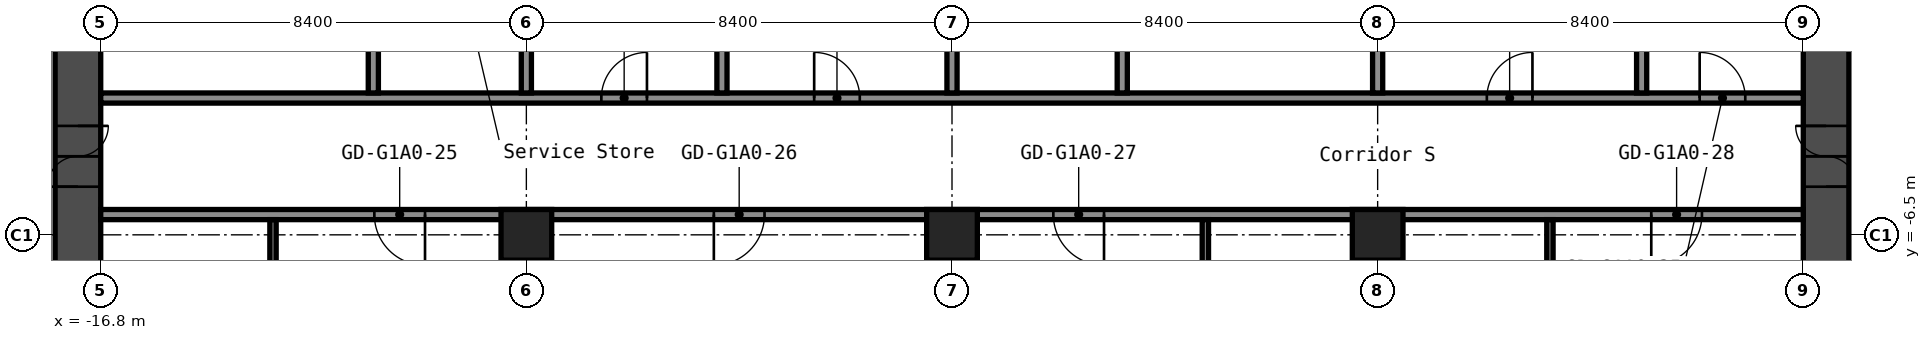
"""IFC4 building model, lengths in metres.
Left out: names, types, materials, properties, quantities, classifications, styles, units other than length and angle.
Written with IfcOpenShell. Run it as: python <this file> out.ifc"""

import sys

from ifc_helpers import new_model, si_unit, direction, frame, frame_2d, origin, origin_2d, place, context, subcontext, project, spatial, rectangle, hollow_rectangle, extrude, element, fill, save


model = new_model("IFC4")
c1 = context("Model", 3, precision=1e-05, world=origin(), true_north=direction((0.0, 1.0)))
c2 = subcontext(c1, "Body", "Model", "MODEL_VIEW")
j1 = project(units=[si_unit("LENGTHUNIT", "METRE"), si_unit("PLANEANGLEUNIT", "RADIAN")], contexts=[c1])
p1 = place(None, origin())
s1 = spatial("IfcSite", under=j1, at=p1, CompositionType="ELEMENT")
p2 = place(p1, origin())
s2 = spatial("IfcBuilding", under=s1, at=p2, CompositionType="ELEMENT")
p3 = place(p2, frame((0.0, 0.0, 19.8)))
s3 = spatial("IfcBuildingStorey", under=s2, at=p3, CompositionType="ELEMENT", Elevation=19.8)
for number, where, z_axis, x_axis in (
    (1, (-8.4, -6.5, 0.0), (0.0, 0.0, 1.0), (1.0, 0.0, 0.0)),
    (2, (0.0, -6.5, 0.0), (0.0, 0.0, 1.0), (1.0, 0.0, 0.0)),
    (3, (8.4, -6.5, 0.0), (0.0, 0.0, 1.0), (1.0, 0.0, 0.0)),
):
    element("IfcColumn", number, at=place(p3, frame(where, z_axis=z_axis, x_axis=x_axis)), inside=s3, PredefinedType="COLUMN", context=c2, shape_type="SweptSolid", body=[
        extrude(hollow_rectangle(XDim=1.0, YDim=1.0, WallThickness=0.04, at=origin_2d()), origin(), (0.0, 0.0, 1.0), 2.8),
    ])
p4 = place(p3, frame((-17.25, -8.4, 0.0), z_axis=(0.0, 0.0, 1.0), x_axis=(0.0, 1.0, 0.0)))
e4 = element("IfcWall", 4, at=p4, inside=s3, PredefinedType="SHEAR", context=c2, shape_type="SweptSolid", body=[
    extrude(rectangle(XDim=16.8, YDim=0.9, at=frame_2d((8.4, 0.0))), origin(), (0.0, 0.0, 1.0), 2.8),
])
p5 = place(p4, frame((12.75, 0.0, 0.0)))
e5 = element("IfcOpeningElement", 5, at=p5, cuts=e4, PredefinedType="OPENING", context=c2, shape_type="SweptSolid", body=[
    extrude(rectangle(XDim=1.2, YDim=2.1, at=frame_2d((0.6, 1.05))), frame((0.0, 0.46, 0.0), z_axis=(0.0, -1.0, 0.0), x_axis=(1.0, 0.0, 0.0)), (0.0, 0.0, 1.0), 0.92),
])
p6 = place(p4, frame((2.85, 0.0, 0.0)))
e6 = element("IfcOpeningElement", 6, at=p6, cuts=e4, PredefinedType="OPENING", context=c2, shape_type="SweptSolid", body=[
    extrude(rectangle(XDim=1.2, YDim=2.1, at=frame_2d((0.6, 1.05))), frame((0.0, 0.46, 0.0), z_axis=(0.0, -1.0, 0.0), x_axis=(1.0, 0.0, 0.0)), (0.0, 0.0, 1.0), 0.92),
])
p7 = place(p3, frame((17.25, -8.4, 0.0), z_axis=(0.0, 0.0, 1.0), x_axis=(0.0, 1.0, 0.0)))
e7 = element("IfcWall", 7, at=p7, inside=s3, PredefinedType="SHEAR", context=c2, shape_type="SweptSolid", body=[
    extrude(rectangle(XDim=16.8, YDim=0.9, at=frame_2d((8.4, 0.0))), origin(), (0.0, 0.0, 1.0), 2.8),
])
p8 = place(p7, frame((12.75, 0.0, 0.0)))
e8 = element("IfcOpeningElement", 8, at=p8, cuts=e7, PredefinedType="OPENING", context=c2, shape_type="SweptSolid", body=[
    extrude(rectangle(XDim=1.2, YDim=2.1, at=frame_2d((0.6, 1.05))), frame((0.0, 0.46, 0.0), z_axis=(0.0, -1.0, 0.0), x_axis=(1.0, 0.0, 0.0)), (0.0, 0.0, 1.0), 0.92),
])
p9 = place(p7, frame((2.85, 0.0, 0.0)))
e9 = element("IfcOpeningElement", 9, at=p9, cuts=e7, PredefinedType="OPENING", context=c2, shape_type="SweptSolid", body=[
    extrude(rectangle(XDim=1.2, YDim=2.1, at=frame_2d((0.6, 1.05))), frame((0.0, 0.46, 0.0), z_axis=(0.0, -1.0, 0.0), x_axis=(1.0, 0.0, 0.0)), (0.0, 0.0, 1.0), 0.92),
])
p10 = place(p3, frame((-16.8, -6.1, 0.0), z_axis=(0.0, 0.0, 1.0), x_axis=(1.0, 0.0, 0.0)))
e10 = element("IfcWall", 10, at=p10, inside=s3, PredefinedType="PARTITIONING", context=c2, shape_type="SweptSolid", body=[
    extrude(rectangle(XDim=33.6, YDim=0.2, at=frame_2d((16.8, 0.0))), origin(), (0.0, 0.0, 1.0), 2.8),
])
p11 = place(p10, frame((5.4, 0.0, 0.0)))
e11 = element("IfcOpeningElement", 11, at=p11, cuts=e10, PredefinedType="OPENING", context=c2, shape_type="SweptSolid", body=[
    extrude(rectangle(XDim=1.0, YDim=2.1, at=frame_2d((0.5, 1.05))), frame((0.0, 0.11, 0.0), z_axis=(0.0, -1.0, 0.0), x_axis=(1.0, 0.0, 0.0)), (0.0, 0.0, 1.0), 0.22),
])
p12 = place(p10, frame((12.1, 0.0, 0.0)))
e12 = element("IfcOpeningElement", 12, at=p12, cuts=e10, PredefinedType="OPENING", context=c2, shape_type="SweptSolid", body=[
    extrude(rectangle(XDim=1.0, YDim=2.1, at=frame_2d((0.5, 1.05))), frame((0.0, 0.11, 0.0), z_axis=(0.0, -1.0, 0.0), x_axis=(1.0, 0.0, 0.0)), (0.0, 0.0, 1.0), 0.22),
])
p13 = place(p10, frame((18.8, 0.0, 0.0)))
e13 = element("IfcOpeningElement", 13, at=p13, cuts=e10, PredefinedType="OPENING", context=c2, shape_type="SweptSolid", body=[
    extrude(rectangle(XDim=1.0, YDim=2.1, at=frame_2d((0.5, 1.05))), frame((0.0, 0.11, 0.0), z_axis=(0.0, -1.0, 0.0), x_axis=(1.0, 0.0, 0.0)), (0.0, 0.0, 1.0), 0.22),
])
p14 = place(p10, frame((30.6, 0.0, 0.0)))
e14 = element("IfcOpeningElement", 14, at=p14, cuts=e10, PredefinedType="OPENING", context=c2, shape_type="SweptSolid", body=[
    extrude(rectangle(XDim=1.0, YDim=2.1, at=frame_2d((0.5, 1.05))), frame((0.0, 0.11, 0.0), z_axis=(0.0, -1.0, 0.0), x_axis=(1.0, 0.0, 0.0)), (0.0, 0.0, 1.0), 0.22),
])
p15 = place(p3, frame((-16.8, -3.8, 0.0), z_axis=(0.0, 0.0, 1.0), x_axis=(1.0, 0.0, 0.0)))
e15 = element("IfcWall", 15, at=p15, inside=s3, PredefinedType="PARTITIONING", context=c2, shape_type="SweptSolid", body=[
    extrude(rectangle(XDim=33.6, YDim=0.2, at=frame_2d((16.8, 0.0))), origin(), (0.0, 0.0, 1.0), 2.8),
])
p16 = place(p15, frame((9.88, 0.0, 0.0)))
e16 = element("IfcOpeningElement", 16, at=p16, cuts=e15, PredefinedType="OPENING", context=c2, shape_type="SweptSolid", body=[
    extrude(rectangle(XDim=0.9, YDim=2.1, at=frame_2d((0.45, 1.05))), frame((0.0, 0.11, 0.0), z_axis=(0.0, -1.0, 0.0), x_axis=(1.0, 0.0, 0.0)), (0.0, 0.0, 1.0), 0.22),
])
p17 = place(p15, frame((14.08, 0.0, 0.0)))
e17 = element("IfcOpeningElement", 17, at=p17, cuts=e15, PredefinedType="OPENING", context=c2, shape_type="SweptSolid", body=[
    extrude(rectangle(XDim=0.9, YDim=2.1, at=frame_2d((0.45, 1.05))), frame((0.0, 0.11, 0.0), z_axis=(0.0, -1.0, 0.0), x_axis=(1.0, 0.0, 0.0)), (0.0, 0.0, 1.0), 0.22),
])
p18 = place(p15, frame((27.355, 0.0, 0.0)))
e18 = element("IfcOpeningElement", 18, at=p18, cuts=e15, PredefinedType="OPENING", context=c2, shape_type="SweptSolid", body=[
    extrude(rectangle(XDim=0.9, YDim=2.1, at=frame_2d((0.45, 1.05))), frame((0.0, 0.11, 0.0), z_axis=(0.0, -1.0, 0.0), x_axis=(1.0, 0.0, 0.0)), (0.0, 0.0, 1.0), 0.22),
])
p19 = place(p15, frame((31.555, 0.0, 0.0)))
e19 = element("IfcOpeningElement", 19, at=p19, cuts=e15, PredefinedType="OPENING", context=c2, shape_type="SweptSolid", body=[
    extrude(rectangle(XDim=0.9, YDim=2.1, at=frame_2d((0.45, 1.05))), frame((0.0, 0.11, 0.0), z_axis=(0.0, -1.0, 0.0), x_axis=(1.0, 0.0, 0.0)), (0.0, 0.0, 1.0), 0.22),
])
p20 = place(p3, frame((-13.4, -9.5, 0.0), z_axis=(0.0, 0.0, 1.0), x_axis=(0.0, 1.0, 0.0)))
e20 = element("IfcWall", 20, at=p20, inside=s3, PredefinedType="PARTITIONING", context=c2, shape_type="SweptSolid", body=[
    extrude(rectangle(XDim=3.3, YDim=0.125, at=frame_2d((1.65, 0.0))), origin(), (0.0, 0.0, 1.0), 2.8),
])
p21 = place(p3, frame((-11.42, -3.7, 0.0), z_axis=(0.0, 0.0, 1.0), x_axis=(0.0, 1.0, 0.0)))
e21 = element("IfcWall", 21, at=p21, inside=s3, PredefinedType="PARTITIONING", context=c2, shape_type="SweptSolid", body=[
    extrude(rectangle(XDim=7.4, YDim=0.2, at=frame_2d((3.7, 0.0))), origin(), (0.0, 0.0, 1.0), 2.8),
])
p22 = place(p3, frame((-8.4, -20.3, 0.0), z_axis=(0.0, 0.0, 1.0), x_axis=(0.0, 1.0, 0.0)))
e22 = element("IfcWall", 22, at=p22, inside=s3, PredefinedType="PARTITIONING", context=c2, shape_type="SweptSolid", body=[
    extrude(rectangle(XDim=13.31, YDim=0.2, at=frame_2d((6.655, 0.0))), origin(), (0.0, 0.0, 1.0), 2.8),
])
for number, where, z_axis, x_axis in (
    (23, (-8.4, -3.7, 0.0), (0.0, 0.0, 1.0), (0.0, 1.0, 0.0)),
    (24, (-4.54, -3.7, 0.0), (0.0, 0.0, 1.0), (0.0, 1.0, 0.0)),
):
    element("IfcWall", number, at=place(p3, frame(where, z_axis=z_axis, x_axis=x_axis)), inside=s3, PredefinedType="PARTITIONING", context=c2, shape_type="SweptSolid", body=[
        extrude(rectangle(XDim=7.4, YDim=0.2, at=frame_2d((3.7, 0.0))), origin(), (0.0, 0.0, 1.0), 2.8),
    ])
p23 = place(p3, frame((0.0, -20.3, 0.0), z_axis=(0.0, 0.0, 1.0), x_axis=(0.0, 1.0, 0.0)))
e25 = element("IfcWall", 25, at=p23, inside=s3, PredefinedType="PARTITIONING", context=c2, shape_type="SweptSolid", body=[
    extrude(rectangle(XDim=13.31, YDim=0.2, at=frame_2d((6.655, 0.0))), origin(), (0.0, 0.0, 1.0), 2.8),
])
for number, where, z_axis, x_axis in (
    (26, (0.0, -3.7, 0.0), (0.0, 0.0, 1.0), (0.0, 1.0, 0.0)),
    (27, (3.36, -3.7, 0.0), (0.0, 0.0, 1.0), (0.0, 1.0, 0.0)),
):
    element("IfcWall", number, at=place(p3, frame(where, z_axis=z_axis, x_axis=x_axis)), inside=s3, PredefinedType="PARTITIONING", context=c2, shape_type="SweptSolid", body=[
        extrude(rectangle(XDim=7.4, YDim=0.2, at=frame_2d((3.7, 0.0))), origin(), (0.0, 0.0, 1.0), 2.8),
    ])
p24 = place(p3, frame((5.0, -9.5, 0.0), z_axis=(0.0, 0.0, 1.0), x_axis=(0.0, 1.0, 0.0)))
e28 = element("IfcWall", 28, at=p24, inside=s3, PredefinedType="PARTITIONING", context=c2, shape_type="SweptSolid", body=[
    extrude(rectangle(XDim=3.3, YDim=0.125, at=frame_2d((1.65, 0.0))), origin(), (0.0, 0.0, 1.0), 2.8),
])
p25 = place(p3, frame((8.4, -20.3, 0.0), z_axis=(0.0, 0.0, 1.0), x_axis=(0.0, 1.0, 0.0)))
e29 = element("IfcWall", 29, at=p25, inside=s3, PredefinedType="PARTITIONING", context=c2, shape_type="SweptSolid", body=[
    extrude(rectangle(XDim=13.31, YDim=0.2, at=frame_2d((6.655, 0.0))), origin(), (0.0, 0.0, 1.0), 2.8),
])
p26 = place(p3, frame((8.4, -3.7, 0.0), z_axis=(0.0, 0.0, 1.0), x_axis=(0.0, 1.0, 0.0)))
e30 = element("IfcWall", 30, at=p26, inside=s3, PredefinedType="PARTITIONING", context=c2, shape_type="SweptSolid", body=[
    extrude(rectangle(XDim=7.4, YDim=0.2, at=frame_2d((3.7, 0.0))), origin(), (0.0, 0.0, 1.0), 2.8),
])
p27 = place(p3, frame((11.8, -9.5, 0.0), z_axis=(0.0, 0.0, 1.0), x_axis=(0.0, 1.0, 0.0)))
e31 = element("IfcWall", 31, at=p27, inside=s3, PredefinedType="PARTITIONING", context=c2, shape_type="SweptSolid", body=[
    extrude(rectangle(XDim=3.3, YDim=0.125, at=frame_2d((1.65, 0.0))), origin(), (0.0, 0.0, 1.0), 2.8),
])
p28 = place(p3, frame((13.61, -3.7, 0.0), z_axis=(0.0, 0.0, 1.0), x_axis=(0.0, 1.0, 0.0)))
e32 = element("IfcWall", 32, at=p28, inside=s3, PredefinedType="PARTITIONING", context=c2, shape_type="SweptSolid", body=[
    extrude(rectangle(XDim=7.4, YDim=0.2, at=frame_2d((3.7, 0.0))), origin(), (0.0, 0.0, 1.0), 2.8),
])
p29 = place(p6, origin())
e33 = element("IfcDoor", 33, at=p29, inside=s3, OperationType="DOUBLE_DOOR_SINGLE_SWING", PredefinedType="DOOR", context=c2, shape_type="SweptSolid", body=[
    extrude(rectangle(XDim=1.2, YDim=2.1, at=frame_2d((0.6, 1.05))), frame((0.0, 0.025, 0.0), z_axis=(0.0, -1.0, 0.0), x_axis=(1.0, 0.0, 0.0)), (0.0, 0.0, 1.0), 0.05),
])
fill(e6, e33)
p30 = place(p9, origin())
e34 = element("IfcDoor", 34, at=p30, inside=s3, OperationType="DOUBLE_DOOR_SINGLE_SWING", PredefinedType="DOOR", context=c2, shape_type="SweptSolid", body=[
    extrude(rectangle(XDim=1.2, YDim=2.1, at=frame_2d((0.6, 1.05))), frame((0.0, 0.025, 0.0), z_axis=(0.0, -1.0, 0.0), x_axis=(1.0, 0.0, 0.0)), (0.0, 0.0, 1.0), 0.05),
])
fill(e9, e34)
p31 = place(p11, origin())
e35 = element("IfcDoor", 35, at=p31, inside=s3, OperationType="SINGLE_SWING_RIGHT", PredefinedType="DOOR", context=c2, shape_type="SweptSolid", body=[
    extrude(rectangle(XDim=1.0, YDim=2.1, at=frame_2d((0.5, 1.05))), frame((0.0, 0.025, 0.0), z_axis=(0.0, -1.0, 0.0), x_axis=(1.0, 0.0, 0.0)), (0.0, 0.0, 1.0), 0.05),
])
fill(e11, e35)
p32 = place(p12, origin())
e36 = element("IfcDoor", 36, at=p32, inside=s3, OperationType="SINGLE_SWING_LEFT", PredefinedType="DOOR", context=c2, shape_type="SweptSolid", body=[
    extrude(rectangle(XDim=1.0, YDim=2.1, at=frame_2d((0.5, 1.05))), frame((0.0, 0.025, 0.0), z_axis=(0.0, -1.0, 0.0), x_axis=(1.0, 0.0, 0.0)), (0.0, 0.0, 1.0), 0.05),
])
fill(e12, e36)
p33 = place(p13, origin())
e37 = element("IfcDoor", 37, at=p33, inside=s3, OperationType="SINGLE_SWING_RIGHT", PredefinedType="DOOR", context=c2, shape_type="SweptSolid", body=[
    extrude(rectangle(XDim=1.0, YDim=2.1, at=frame_2d((0.5, 1.05))), frame((0.0, 0.025, 0.0), z_axis=(0.0, -1.0, 0.0), x_axis=(1.0, 0.0, 0.0)), (0.0, 0.0, 1.0), 0.05),
])
fill(e13, e37)
p34 = place(p14, origin())
e38 = element("IfcDoor", 38, at=p34, inside=s3, OperationType="SINGLE_SWING_LEFT", PredefinedType="DOOR", context=c2, shape_type="SweptSolid", body=[
    extrude(rectangle(XDim=1.0, YDim=2.1, at=frame_2d((0.5, 1.05))), frame((0.0, 0.025, 0.0), z_axis=(0.0, -1.0, 0.0), x_axis=(1.0, 0.0, 0.0)), (0.0, 0.0, 1.0), 0.05),
])
fill(e14, e38)
p35 = place(p16, origin())
e39 = element("IfcDoor", 39, at=p35, inside=s3, OperationType="SINGLE_SWING_LEFT", PredefinedType="DOOR", context=c2, shape_type="SweptSolid", body=[
    extrude(rectangle(XDim=0.9, YDim=2.1, at=frame_2d((0.45, 1.05))), frame((0.0, 0.025, 0.0), z_axis=(0.0, -1.0, 0.0), x_axis=(1.0, 0.0, 0.0)), (0.0, 0.0, 1.0), 0.05),
])
fill(e16, e39)
p36 = place(p17, origin())
e40 = element("IfcDoor", 40, at=p36, inside=s3, OperationType="SINGLE_SWING_RIGHT", PredefinedType="DOOR", context=c2, shape_type="SweptSolid", body=[
    extrude(rectangle(XDim=0.9, YDim=2.1, at=frame_2d((0.45, 1.05))), frame((0.0, 0.025, 0.0), z_axis=(0.0, -1.0, 0.0), x_axis=(1.0, 0.0, 0.0)), (0.0, 0.0, 1.0), 0.05),
])
fill(e17, e40)
p37 = place(p18, origin())
e41 = element("IfcDoor", 41, at=p37, inside=s3, OperationType="SINGLE_SWING_LEFT", PredefinedType="DOOR", context=c2, shape_type="SweptSolid", body=[
    extrude(rectangle(XDim=0.9, YDim=2.1, at=frame_2d((0.45, 1.05))), frame((0.0, 0.025, 0.0), z_axis=(0.0, -1.0, 0.0), x_axis=(1.0, 0.0, 0.0)), (0.0, 0.0, 1.0), 0.05),
])
fill(e18, e41)
p38 = place(p19, origin())
e42 = element("IfcDoor", 42, at=p38, inside=s3, OperationType="SINGLE_SWING_RIGHT", PredefinedType="DOOR", context=c2, shape_type="SweptSolid", body=[
    extrude(rectangle(XDim=0.9, YDim=2.1, at=frame_2d((0.45, 1.05))), frame((0.0, 0.025, 0.0), z_axis=(0.0, -1.0, 0.0), x_axis=(1.0, 0.0, 0.0)), (0.0, 0.0, 1.0), 0.05),
])
fill(e19, e42)
save(model, sys.argv[1])
